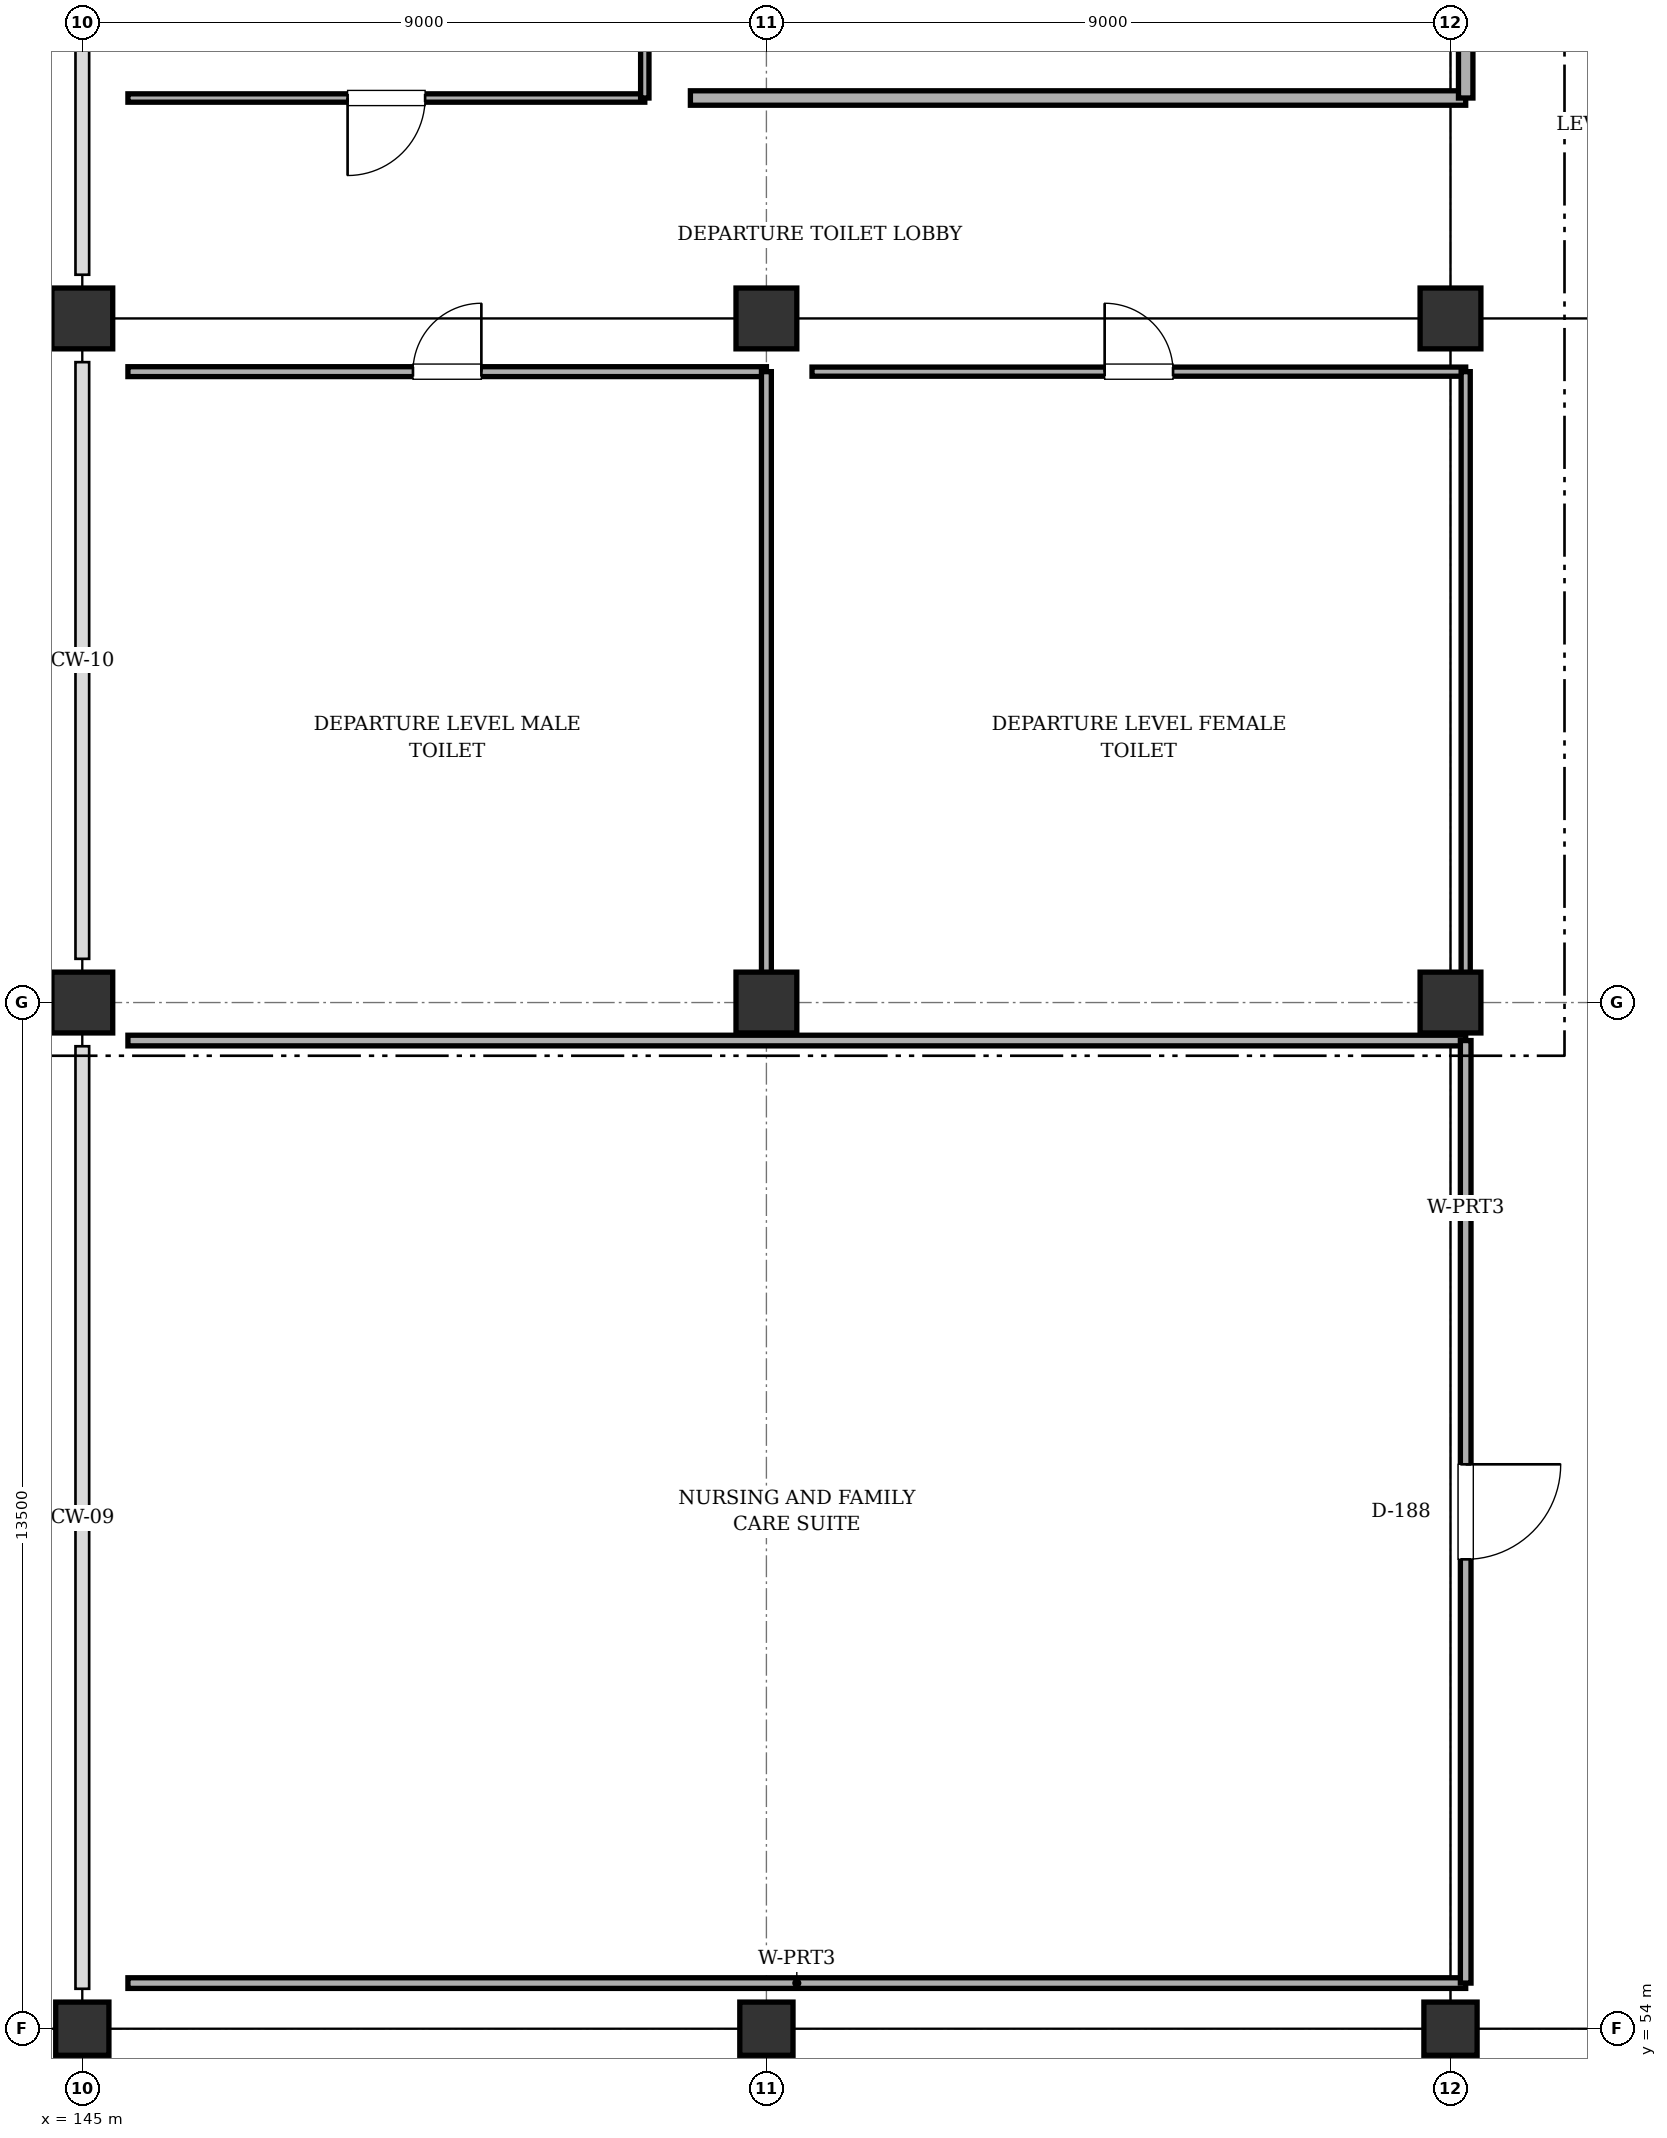
"""IFC4 building model, lengths in metres.
Left out: names, types, materials, properties, quantities, classifications, styles, units other than length and angle.
Written with IfcOpenShell. Run it as: python <this file> out.ifc"""

import sys

from ifc_helpers import new_model, si_unit, direction, frame, frame_2d, origin, origin_2d, place, context, subcontext, project, spatial, rectangle, extrude, element, fill, save


model = new_model("IFC4")
c1 = context("Model", 3, precision=1e-05, world=origin(), true_north=direction((0.0, 1.0)))
c2 = subcontext(c1, "Body", "Model", "MODEL_VIEW")
j1 = project(units=[si_unit("LENGTHUNIT", "METRE"), si_unit("PLANEANGLEUNIT", "RADIAN")], contexts=[c1])
p1 = place(None, origin())
s1 = spatial("IfcSite", under=j1, at=p1, CompositionType="ELEMENT")
p2 = place(p1, origin())
s2 = spatial("IfcBuilding", under=s1, at=p2, CompositionType="ELEMENT")
p3 = place(p2, frame((0.0, 0.0, 6.6)))
s3 = spatial("IfcBuildingStorey", under=s2, at=p3, CompositionType="ELEMENT", Elevation=6.6)
p4 = place(p3, frame((145.0, 54.0, 0.0), z_axis=(0.0, 0.0, 1.0), x_axis=(1.0, 0.0, 0.0)))
e1 = element("IfcColumn", 1, at=p4, inside=s3, PredefinedType="COLUMN", context=c2, shape_type="SweptSolid", body=[
    extrude(rectangle(XDim=0.7, YDim=0.7, at=origin_2d()), origin(), (0.0, 0.0, 1.0), 4.2),
])
for number, where, z_axis, x_axis in (
    (2, (145.0, 67.5, 0.0), (0.0, 0.0, 1.0), (1.0, 0.0, 0.0)),
    (3, (145.0, 76.5, 0.0), (0.0, 0.0, 1.0), (1.0, 0.0, 0.0)),
):
    element("IfcColumn", number, at=place(p3, frame(where, z_axis=z_axis, x_axis=x_axis)), inside=s3, PredefinedType="COLUMN", context=c2, shape_type="SweptSolid", body=[
        extrude(rectangle(XDim=0.8, YDim=0.8, at=origin_2d()), origin(), (0.0, 0.0, 1.0), 4.2),
    ])
p5 = place(p3, frame((154.0, 54.0, 0.0), z_axis=(0.0, 0.0, 1.0), x_axis=(1.0, 0.0, 0.0)))
e4 = element("IfcColumn", 4, at=p5, inside=s3, PredefinedType="COLUMN", context=c2, shape_type="SweptSolid", body=[
    extrude(rectangle(XDim=0.7, YDim=0.7, at=origin_2d()), origin(), (0.0, 0.0, 1.0), 4.2),
])
for number, where, z_axis, x_axis in (
    (5, (154.0, 67.5, 0.0), (0.0, 0.0, 1.0), (1.0, 0.0, 0.0)),
    (6, (154.0, 76.5, 0.0), (0.0, 0.0, 1.0), (1.0, 0.0, 0.0)),
):
    element("IfcColumn", number, at=place(p3, frame(where, z_axis=z_axis, x_axis=x_axis)), inside=s3, PredefinedType="COLUMN", context=c2, shape_type="SweptSolid", body=[
        extrude(rectangle(XDim=0.8, YDim=0.8, at=origin_2d()), origin(), (0.0, 0.0, 1.0), 4.2),
    ])
p6 = place(p3, frame((163.0, 54.0, 0.0), z_axis=(0.0, 0.0, 1.0), x_axis=(1.0, 0.0, 0.0)))
e7 = element("IfcColumn", 7, at=p6, inside=s3, PredefinedType="COLUMN", context=c2, shape_type="SweptSolid", body=[
    extrude(rectangle(XDim=0.7, YDim=0.7, at=origin_2d()), origin(), (0.0, 0.0, 1.0), 4.2),
])
for number, where, z_axis, x_axis in (
    (8, (163.0, 67.5, 0.0), (0.0, 0.0, 1.0), (1.0, 0.0, 0.0)),
    (9, (163.0, 76.5, 0.0), (0.0, 0.0, 1.0), (1.0, 0.0, 0.0)),
):
    element("IfcColumn", number, at=place(p3, frame(where, z_axis=z_axis, x_axis=x_axis)), inside=s3, PredefinedType="COLUMN", context=c2, shape_type="SweptSolid", body=[
        extrude(rectangle(XDim=0.8, YDim=0.8, at=origin_2d()), origin(), (0.0, 0.0, 1.0), 4.2),
    ])
for number, where, z_axis, x_axis in (
    (10, (163.2, 54.6, 0.0), (0.0, 0.0, 1.0), (-1.0, 0.0, 0.0)),
    (11, (145.6, 67.0, 0.0), (0.0, 0.0, 1.0), (1.0, 0.0, 0.0)),
):
    element("IfcWall", number, at=place(p3, frame(where, z_axis=z_axis, x_axis=x_axis)), inside=s3, PredefinedType="PARTITIONING", context=c2, shape_type="SweptSolid", body=[
        extrude(rectangle(XDim=17.6, YDim=0.14, at=frame_2d((8.8, 0.0))), origin(), (0.0, 0.0, 1.0), 3.37),
    ])
p7 = place(p3, frame((163.2, 67.0, 0.0), z_axis=(0.0, 0.0, 1.0), x_axis=(0.0, -1.0, 0.0)))
e12 = element("IfcWall", 12, at=p7, inside=s3, PredefinedType="PARTITIONING", context=c2, shape_type="SweptSolid", body=[
    extrude(rectangle(XDim=12.4, YDim=0.14, at=frame_2d((6.2, 0.0))), origin(), (0.0, 0.0, 1.0), 3.37),
])
p8 = place(p7, frame((5.575, 0.0, 0.0)))
e13 = element("IfcOpeningElement", 13, at=p8, cuts=e12, PredefinedType="OPENING", context=c2, shape_type="SweptSolid", body=[
    extrude(rectangle(XDim=1.25, YDim=2.1, at=frame_2d((0.625, 1.05))), frame((0.0, 0.08, 0.0), z_axis=(0.0, -1.0, 0.0), x_axis=(1.0, 0.0, 0.0)), (0.0, 0.0, 1.0), 0.16),
])
p9 = place(p3, frame((145.6, 75.8, 0.0), z_axis=(0.0, 0.0, 1.0), x_axis=(1.0, 0.0, 0.0)))
e14 = element("IfcWall", 14, at=p9, inside=s3, PredefinedType="PARTITIONING", context=c2, shape_type="SweptSolid", body=[
    extrude(rectangle(XDim=8.4, YDim=0.13, at=frame_2d((4.2, 0.0))), origin(), (0.0, 0.0, 1.0), 3.515),
])
p10 = place(p9, frame((3.75, 0.0, 0.0)))
e15 = element("IfcOpeningElement", 15, at=p10, cuts=e14, PredefinedType="OPENING", context=c2, shape_type="SweptSolid", body=[
    extrude(rectangle(XDim=0.9, YDim=2.1, at=frame_2d((0.45, 1.05))), frame((0.0, 0.075, 0.0), z_axis=(0.0, -1.0, 0.0), x_axis=(1.0, 0.0, 0.0)), (0.0, 0.0, 1.0), 0.15),
])
p11 = place(p3, frame((154.0, 75.8, 0.0), z_axis=(0.0, 0.0, 1.0), x_axis=(0.0, -1.0, 0.0)))
e16 = element("IfcWall", 16, at=p11, inside=s3, PredefinedType="PARTITIONING", context=c2, shape_type="SweptSolid", body=[
    extrude(rectangle(XDim=8.2, YDim=0.13, at=frame_2d((4.1, 0.0))), origin(), (0.0, 0.0, 1.0), 3.37),
])
p12 = place(p3, frame((154.6, 75.8, 0.0), z_axis=(0.0, 0.0, 1.0), x_axis=(1.0, 0.0, 0.0)))
e17 = element("IfcWall", 17, at=p12, inside=s3, PredefinedType="PARTITIONING", context=c2, shape_type="SweptSolid", body=[
    extrude(rectangle(XDim=8.6, YDim=0.12, at=frame_2d((4.3, 0.0))), origin(), (0.0, 0.0, 1.0), 3.515),
])
p13 = place(p12, frame((3.85, 0.0, 0.0)))
e18 = element("IfcOpeningElement", 18, at=p13, cuts=e17, PredefinedType="OPENING", context=c2, shape_type="SweptSolid", body=[
    extrude(rectangle(XDim=0.9, YDim=2.1, at=frame_2d((0.45, 1.05))), frame((0.0, 0.07, 0.0), z_axis=(0.0, -1.0, 0.0), x_axis=(1.0, 0.0, 0.0)), (0.0, 0.0, 1.0), 0.14),
])
p14 = place(p3, frame((163.2, 75.8, 0.0), z_axis=(0.0, 0.0, 1.0), x_axis=(0.0, -1.0, 0.0)))
e19 = element("IfcWall", 19, at=p14, inside=s3, PredefinedType="PARTITIONING", context=c2, shape_type="SweptSolid", body=[
    extrude(rectangle(XDim=8.2, YDim=0.12, at=frame_2d((4.1, 0.0))), origin(), (0.0, 0.0, 1.0), 3.37),
])
p15 = place(p3, frame((152.4, 79.4, 0.0), z_axis=(0.0, 0.0, 1.0), x_axis=(-1.0, 0.0, 0.0)))
e20 = element("IfcWall", 20, at=p15, inside=s3, PredefinedType="PARTITIONING", context=c2, shape_type="SweptSolid", body=[
    extrude(rectangle(XDim=6.8, YDim=0.11, at=frame_2d((3.4, 0.0))), origin(), (0.0, 0.0, 1.0), 3.565),
])
p16 = place(p15, frame((2.89, 0.0, 0.0)))
e21 = element("IfcOpeningElement", 21, at=p16, cuts=e20, PredefinedType="OPENING", context=c2, shape_type="SweptSolid", body=[
    extrude(rectangle(XDim=1.02, YDim=2.05, at=frame_2d((0.51, 1.025))), frame((0.0, 0.065, 0.0), z_axis=(0.0, -1.0, 0.0), x_axis=(1.0, 0.0, 0.0)), (0.0, 0.0, 1.0), 0.13),
])
p17 = place(p3, frame((152.4, 84.8, 0.0), z_axis=(0.0, 0.0, 1.0), x_axis=(0.0, -1.0, 0.0)))
e22 = element("IfcWall", 22, at=p17, inside=s3, PredefinedType="PARTITIONING", context=c2, shape_type="SweptSolid", body=[
    extrude(rectangle(XDim=5.4, YDim=0.11, at=frame_2d((2.7, 0.0))), origin(), (0.0, 0.0, 1.0), 3.515),
])
p18 = place(p3, frame((163.2, 79.4, 0.0), z_axis=(0.0, 0.0, 1.0), x_axis=(-1.0, 0.0, 0.0)))
e23 = element("IfcWall", 23, at=p18, inside=s3, PredefinedType="PARTITIONING", context=c2, shape_type="SweptSolid", body=[
    extrude(rectangle(XDim=10.2, YDim=0.19, at=frame_2d((5.1, 0.0))), origin(), (0.0, 0.0, 1.0), 3.565),
])
p19 = place(p3, frame((163.2, 103.0, 0.0), z_axis=(0.0, 0.0, 1.0), x_axis=(0.0, -1.0, 0.0)))
e24 = element("IfcWall", 24, at=p19, inside=s3, PredefinedType="PARTITIONING", context=c2, shape_type="SweptSolid", body=[
    extrude(rectangle(XDim=23.6, YDim=0.19, at=frame_2d((11.8, 0.0))), origin(), (0.0, 0.0, 1.0), 3.355),
])
p20 = place(p19, frame((11.225, 0.0, 0.0)))
e25 = element("IfcOpeningElement", 25, at=p20, cuts=e24, PredefinedType="OPENING", context=c2, shape_type="SweptSolid", body=[
    extrude(rectangle(XDim=1.15, YDim=2.1, at=frame_2d((0.575, 1.05))), frame((0.0, 0.105, 0.0), z_axis=(0.0, -1.0, 0.0), x_axis=(1.0, 0.0, 0.0)), (0.0, 0.0, 1.0), 0.21),
])
p21 = place(p8, origin())
e26 = element("IfcDoor", 26, at=p21, inside=s3, OperationType="SINGLE_SWING_LEFT", PredefinedType="DOOR", context=c2, shape_type="SweptSolid", body=[
    extrude(rectangle(XDim=1.25, YDim=2.1, at=frame_2d((0.625, 1.05))), frame((0.0, 0.025, 0.0), z_axis=(0.0, -1.0, 0.0), x_axis=(1.0, 0.0, 0.0)), (0.0, 0.0, 1.0), 0.05),
])
fill(e13, e26)
p22 = place(p10, origin())
e27 = element("IfcDoor", 27, at=p22, inside=s3, OperationType="SINGLE_SWING_RIGHT", PredefinedType="DOOR", context=c2, shape_type="SweptSolid", body=[
    extrude(rectangle(XDim=0.9, YDim=2.1, at=frame_2d((0.45, 1.05))), frame((0.0, 0.025, 0.0), z_axis=(0.0, -1.0, 0.0), x_axis=(1.0, 0.0, 0.0)), (0.0, 0.0, 1.0), 0.05),
])
fill(e15, e27)
p23 = place(p13, origin())
e28 = element("IfcDoor", 28, at=p23, inside=s3, OperationType="SINGLE_SWING_LEFT", PredefinedType="DOOR", context=c2, shape_type="SweptSolid", body=[
    extrude(rectangle(XDim=0.9, YDim=2.1, at=frame_2d((0.45, 1.05))), frame((0.0, 0.025, 0.0), z_axis=(0.0, -1.0, 0.0), x_axis=(1.0, 0.0, 0.0)), (0.0, 0.0, 1.0), 0.05),
])
fill(e18, e28)
p24 = place(p16, origin())
e29 = element("IfcDoor", 29, at=p24, inside=s3, OperationType="SINGLE_SWING_RIGHT", PredefinedType="DOOR", context=c2, shape_type="SweptSolid", body=[
    extrude(rectangle(XDim=1.02, YDim=2.05, at=frame_2d((0.51, 1.025))), frame((0.0, 0.025, 0.0), z_axis=(0.0, -1.0, 0.0), x_axis=(1.0, 0.0, 0.0)), (0.0, 0.0, 1.0), 0.05),
])
fill(e21, e29)
save(model, sys.argv[1])
